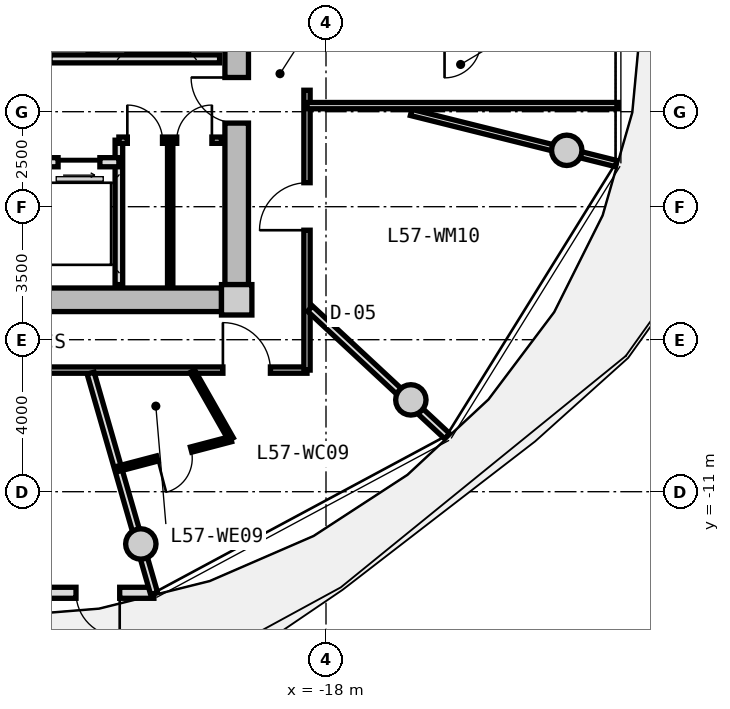
"""IFC4 building model, lengths in metres.
Left out: names, types, materials, properties, quantities, classifications, styles, units other than length and angle.
Written with IfcOpenShell. Run it as: python <this file> out.ifc"""

import sys

from ifc_helpers import new_model, si_unit, direction, frame, frame_2d, origin, origin_2d, place, context, subcontext, project, spatial, rectangle, circle, extrude, source, transform, mapped, element, fill, save


model = new_model("IFC4")
c1 = context("Model", 3, precision=1e-05, world=origin(), true_north=direction((0.0, 1.0)))
c2 = subcontext(c1, "Body", "Model", "MODEL_VIEW")
j1 = project(units=[si_unit("LENGTHUNIT", "METRE"), si_unit("PLANEANGLEUNIT", "RADIAN")], contexts=[c1])
p1 = place(None, origin())
s1 = spatial("IfcSite", under=j1, at=p1, CompositionType="ELEMENT")
p2 = place(p1, origin())
s2 = spatial("IfcBuilding", under=s1, at=p2, CompositionType="ELEMENT")
p3 = place(p2, frame((0.0, 0.0, 183.1)))
s3 = spatial("IfcBuildingStorey", under=s2, at=p3, CompositionType="ELEMENT", Elevation=183.1)
m1 = source(origin(), c2, "Body", "SweptSolid", [
    extrude(rectangle(XDim=0.8, YDim=0.8, at=origin_2d()), origin(), (0.0, 0.0, 1.0), 3.05),
])
p4 = place(p3, frame((-20.35, -5.95, 0.0), z_axis=(0.0, 0.0, 1.0), x_axis=(1.0, 0.0, 0.0)))
e1 = element("IfcColumn", 1, at=p4, inside=s3, PredefinedType="COLUMN", context=c2, shape_type="MappedRepresentation", body=[
    mapped(m1, transform((0.0, 0.0, 0.0), x_axis=(1.0, 0.0, 0.0), y_axis=(0.0, 1.0, 0.0), z_axis=(0.0, 0.0, 1.0), scale=1.0)),
])
m2 = source(origin(), c2, "Body", "SweptSolid", [
    extrude(rectangle(XDim=14.5, YDim=0.62, at=frame_2d((7.25, 0.0))), origin(), (0.0, 0.0, 1.0), 2.73),
])
p5 = place(p3, frame((-20.75, -5.95, 0.0), z_axis=(0.0, 0.0, 1.0), x_axis=(-1.0, 0.0, 0.0)))
e2 = element("IfcWall", 2, at=p5, inside=s3, PredefinedType="SHEAR", context=c2, shape_type="MappedRepresentation", body=[
    mapped(m2, transform((0.0, 0.0, 0.0), x_axis=(1.0, 0.0, 0.0), y_axis=(0.0, 1.0, 0.0), z_axis=(0.0, 0.0, 1.0), scale=1.0)),
])
m3 = source(origin(), c2, "Body", "SweptSolid", [
    extrude(rectangle(XDim=11.1, YDim=0.62, at=frame_2d((5.55, 0.0))), origin(), (0.0, 0.0, 1.0), 2.73),
])
p6 = place(p3, frame((-20.35, 5.55, 0.0), z_axis=(0.0, 0.0, 1.0), x_axis=(0.0, -1.0, 0.0)))
e3 = element("IfcWall", 3, at=p6, inside=s3, PredefinedType="SHEAR", context=c2, shape_type="MappedRepresentation", body=[
    mapped(m3, transform((0.0, 0.0, 0.0), x_axis=(1.0, 0.0, 0.0), y_axis=(0.0, 1.0, 0.0), z_axis=(0.0, 0.0, 1.0), scale=1.0)),
])
p7 = place(p6, frame((5.65, 0.0, 0.0)))
e4 = element("IfcOpeningElement", 4, at=p7, cuts=e3, PredefinedType="OPENING", context=c2, shape_type="SweptSolid", body=[
    extrude(rectangle(XDim=1.2, YDim=2.15, at=frame_2d((0.6, 1.075))), frame((0.0, 0.32, 0.0), z_axis=(0.0, -1.0, 0.0), x_axis=(1.0, 0.0, 0.0)), (0.0, 0.0, 1.0), 0.64),
])
m4 = source(origin(), c2, "Body", "SweptSolid", [
    extrude(circle(Radius=0.4, at=origin_2d()), origin(), (0.0, 0.0, 1.0), 3.05),
])
for number, where, z_axis, x_axis in (
    (5, (-22.873, -12.375, 0.0), (0.0, 0.0, 1.0), (1.0, 0.0, 0.0)),
    (6, (-15.767, -8.584, 0.0), (0.0, 0.0, 1.0), (1.0, 0.0, 0.0)),
    (7, (-11.665, -2.016, 0.0), (0.0, 0.0, 1.0), (1.0, 0.0, 0.0)),
):
    element("IfcColumn", number, at=place(p3, frame(where, z_axis=z_axis, x_axis=x_axis)), inside=s3, PredefinedType="COLUMN", context=c2, shape_type="MappedRepresentation", body=[
        mapped(m4, transform((0.0, 0.0, 0.0), x_axis=(1.0, 0.0, 0.0), y_axis=(0.0, 1.0, 0.0), z_axis=(0.0, 0.0, 1.0), scale=1.0)),
    ])
m5 = source(origin(), c2, "Body", "SweptSolid", [
    extrude(rectangle(XDim=8.893, YDim=0.29, at=frame_2d((4.447, 0.0))), origin(), (0.0, 0.0, 1.0), 2.73),
])
p8 = place(p3, frame((-22.529, -13.66, 0.0), z_axis=(0.0, 0.0, 1.0), x_axis=(-1.0, 0.0, 0.0)))
e8 = element("IfcWall", 8, at=p8, inside=s3, PredefinedType="SOLIDWALL", context=c2, shape_type="MappedRepresentation", body=[
    mapped(m5, transform((0.0, 0.0, 0.0), x_axis=(1.0, 0.0, 0.0), y_axis=(0.0, 1.0, 0.0), z_axis=(0.0, 0.0, 1.0), scale=1.0)),
])
p9 = place(p8, frame((0.9, 0.0, 0.0)))
e9 = element("IfcOpeningElement", 9, at=p9, cuts=e8, PredefinedType="OPENING", context=c2, shape_type="SweptSolid", body=[
    extrude(rectangle(XDim=1.15, YDim=2.25, at=frame_2d((0.575, 1.125))), frame((0.0, 0.155, 0.0), z_axis=(0.0, -1.0, 0.0), x_axis=(1.0, 0.0, 0.0)), (0.0, 0.0, 1.0), 0.31),
])
p10 = place(p8, frame((4.796, 0.0, 0.85)))
e10 = element("IfcOpeningElement", 10, at=p10, cuts=e8, PredefinedType="OPENING", context=c2, shape_type="SweptSolid", body=[
    extrude(rectangle(XDim=1.2, YDim=1.5, at=frame_2d((0.6, 0.75))), frame((0.0, 0.155, 0.0), z_axis=(0.0, -1.0, 0.0), x_axis=(1.0, 0.0, 0.0)), (0.0, 0.0, 1.0), 0.31),
])
m6 = source(origin(), c2, "Body", "SweptSolid", [
    extrude(rectangle(XDim=5.0, YDim=0.24, at=frame_2d((2.5, 0.0))), origin(), (0.0, 0.0, 1.0), 2.715),
])
p11 = place(p3, frame((-24.14, 0.5, 0.0), z_axis=(0.0, 0.0, 1.0), x_axis=(0.0, 1.0, 0.0)))
e11 = element("IfcWall", 11, at=p11, inside=s3, PredefinedType="PARTITIONING", context=c2, shape_type="MappedRepresentation", body=[
    mapped(m6, transform((0.0, 0.0, 0.0), x_axis=(1.0, 0.0, 0.0), y_axis=(0.0, 1.0, 0.0), z_axis=(0.0, 0.0, 1.0), scale=1.0)),
])
p12 = place(p11, frame((3.05, 0.0, 0.0)))
e12 = element("IfcOpeningElement", 12, at=p12, cuts=e11, PredefinedType="OPENING", context=c2, shape_type="SweptSolid", body=[
    extrude(rectangle(XDim=1.3, YDim=2.2, at=frame_2d((0.65, 1.1))), frame((0.0, 0.13, 0.0), z_axis=(0.0, -1.0, 0.0), x_axis=(1.0, 0.0, 0.0)), (0.0, 0.0, 1.0), 0.26),
])
p13 = place(p11, frame((0.55, 0.0, 0.0)))
e13 = element("IfcOpeningElement", 13, at=p13, cuts=e11, PredefinedType="OPENING", context=c2, shape_type="SweptSolid", body=[
    extrude(rectangle(XDim=1.3, YDim=2.2, at=frame_2d((0.65, 1.1))), frame((0.0, 0.13, 0.0), z_axis=(0.0, -1.0, 0.0), x_axis=(1.0, 0.0, 0.0)), (0.0, 0.0, 1.0), 0.26),
])
m7 = source(origin(), c2, "Body", "SweptSolid", [
    extrude(rectangle(XDim=6.66, YDim=0.21, at=frame_2d((3.33, 0.0))), origin(), (0.0, 0.0, 1.0), 2.715),
])
p14 = place(p3, frame((-27.46, 0.39, 0.0), z_axis=(0.0, 0.0, 1.0), x_axis=(1.0, 0.0, 0.0)))
e14 = element("IfcWall", 14, at=p14, inside=s3, PredefinedType="PARTITIONING", context=c2, shape_type="MappedRepresentation", body=[
    mapped(m7, transform((0.0, 0.0, 0.0), x_axis=(1.0, 0.0, 0.0), y_axis=(0.0, 1.0, 0.0), z_axis=(0.0, 0.0, 1.0), scale=1.0)),
])
p15 = place(p14, frame((1.0, 0.0, 0.0)))
e15 = element("IfcOpeningElement", 15, at=p15, cuts=e14, PredefinedType="OPENING", context=c2, shape_type="SweptSolid", body=[
    extrude(rectangle(XDim=1.2, YDim=2.15, at=frame_2d((0.6, 1.075))), frame((0.0, 0.115, 0.0), z_axis=(0.0, -1.0, 0.0), x_axis=(1.0, 0.0, 0.0)), (0.0, 0.0, 1.0), 0.23),
])
m8 = source(origin(), c2, "Body", "SweptSolid", [
    extrude(rectangle(XDim=3.8, YDim=0.2, at=frame_2d((1.9, 0.0))), origin(), (0.0, 0.0, 1.0), 2.715),
])
p16 = place(p3, frame((-23.45, -5.55, 0.0), z_axis=(0.0, 0.0, 1.0), x_axis=(0.0, 1.0, 0.0)))
e16 = element("IfcWall", 16, at=p16, inside=s3, PredefinedType="PARTITIONING", context=c2, shape_type="MappedRepresentation", body=[
    mapped(m8, transform((0.0, 0.0, 0.0), x_axis=(1.0, 0.0, 0.0), y_axis=(0.0, 1.0, 0.0), z_axis=(0.0, 0.0, 1.0), scale=1.0)),
])
m9 = source(origin(), c2, "Body", "SweptSolid", [
    extrude(rectangle(XDim=2.05, YDim=0.24, at=frame_2d((1.025, 0.0))), origin(), (0.0, 0.0, 1.0), 2.715),
])
p17 = place(p3, frame((-25.5, -2.33, 0.0), z_axis=(0.0, 0.0, 1.0), x_axis=(1.0, 0.0, 0.0)))
e17 = element("IfcWall", 17, at=p17, inside=s3, PredefinedType="PARTITIONING", context=c2, shape_type="MappedRepresentation", body=[
    mapped(m9, transform((0.0, 0.0, 0.0), x_axis=(1.0, 0.0, 0.0), y_axis=(0.0, 1.0, 0.0), z_axis=(0.0, 0.0, 1.0), scale=1.0)),
])
p18 = place(p17, frame((0.45, 0.0, 0.0)))
e18 = element("IfcOpeningElement", 18, at=p18, cuts=e17, PredefinedType="OPENING", context=c2, shape_type="SweptSolid", body=[
    extrude(rectangle(XDim=1.1, YDim=2.2, at=frame_2d((0.55, 1.1))), frame((0.0, 0.13, 0.0), z_axis=(0.0, -1.0, 0.0), x_axis=(1.0, 0.0, 0.0)), (0.0, 0.0, 1.0), 0.26),
])
m10 = source(origin(), c2, "Body", "SweptSolid", [
    extrude(rectangle(XDim=2.7, YDim=0.165, at=frame_2d((1.35, 0.0))), origin(), (0.0, 0.0, 1.0), 2.715),
])
p19 = place(p3, frame((-23.45, -1.75, 0.0), z_axis=(0.0, 0.0, 1.0), x_axis=(1.0, 0.0, 0.0)))
e19 = element("IfcWall", 19, at=p19, inside=s3, PredefinedType="PARTITIONING", context=c2, shape_type="MappedRepresentation", body=[
    mapped(m10, transform((0.0, 0.0, 0.0), x_axis=(1.0, 0.0, 0.0), y_axis=(0.0, 1.0, 0.0), z_axis=(0.0, 0.0, 1.0), scale=1.0)),
])
p20 = place(p19, frame((0.222, 0.0, 0.0)))
e20 = element("IfcOpeningElement", 20, at=p20, cuts=e19, PredefinedType="OPENING", context=c2, shape_type="SweptSolid", body=[
    extrude(rectangle(XDim=0.925, YDim=2.1, at=frame_2d((0.462, 1.05))), frame((0.0, 0.093, 0.0), z_axis=(0.0, -1.0, 0.0), x_axis=(1.0, 0.0, 0.0)), (0.0, 0.0, 1.0), 0.185),
])
p21 = place(p19, frame((1.522, 0.0, 0.0)))
e21 = element("IfcOpeningElement", 21, at=p21, cuts=e19, PredefinedType="OPENING", context=c2, shape_type="SweptSolid", body=[
    extrude(rectangle(XDim=0.925, YDim=2.1, at=frame_2d((0.462, 1.05))), frame((0.0, 0.093, 0.0), z_axis=(0.0, -1.0, 0.0), x_axis=(1.0, 0.0, 0.0)), (0.0, 0.0, 1.0), 0.185),
])
m11 = source(origin(), c2, "Body", "SweptSolid", [
    extrude(rectangle(XDim=3.8, YDim=0.14, at=frame_2d((1.9, 0.0))), origin(), (0.0, 0.0, 1.0), 2.715),
])
p22 = place(p3, frame((-22.1, -5.55, 0.0), z_axis=(0.0, 0.0, 1.0), x_axis=(0.0, 1.0, 0.0)))
e22 = element("IfcWall", 22, at=p22, inside=s3, PredefinedType="PARTITIONING", context=c2, shape_type="MappedRepresentation", body=[
    mapped(m11, transform((0.0, 0.0, 0.0), x_axis=(1.0, 0.0, 0.0), y_axis=(0.0, 1.0, 0.0), z_axis=(0.0, 0.0, 1.0), scale=1.0)),
])
m12 = source(origin(), c2, "Body", "SweptSolid", [
    extrude(rectangle(XDim=19.0, YDim=0.165, at=frame_2d((9.5, 0.0))), origin(), (0.0, 0.0, 1.0), 2.715),
])
p23 = place(p3, frame((-18.5, -7.8, 0.0), z_axis=(0.0, 0.0, 1.0), x_axis=(-1.0, 0.0, 0.0)))
e23 = element("IfcWall", 23, at=p23, inside=s3, PredefinedType="PARTITIONING", context=c2, shape_type="MappedRepresentation", body=[
    mapped(m12, transform((0.0, 0.0, 0.0), x_axis=(1.0, 0.0, 0.0), y_axis=(0.0, 1.0, 0.0), z_axis=(0.0, 0.0, 1.0), scale=1.0)),
])
p24 = place(p23, frame((11.598, 0.0, 0.0)))
e24 = element("IfcOpeningElement", 24, at=p24, cuts=e23, PredefinedType="OPENING", context=c2, shape_type="SweptSolid", body=[
    extrude(rectangle(XDim=1.25, YDim=2.2, at=frame_2d((0.625, 1.1))), frame((0.0, 0.093, 0.0), z_axis=(0.0, -1.0, 0.0), x_axis=(1.0, 0.0, 0.0)), (0.0, 0.0, 1.0), 0.185),
])
p25 = place(p23, frame((0.963, 0.0, 0.0)))
e25 = element("IfcOpeningElement", 25, at=p25, cuts=e23, PredefinedType="OPENING", context=c2, shape_type="SweptSolid", body=[
    extrude(rectangle(XDim=1.25, YDim=2.2, at=frame_2d((0.625, 1.1))), frame((0.0, 0.093, 0.0), z_axis=(0.0, -1.0, 0.0), x_axis=(1.0, 0.0, 0.0)), (0.0, 0.0, 1.0), 0.185),
])
m13 = source(origin(), c2, "Body", "SweptSolid", [
    extrude(rectangle(XDim=7.365, YDim=0.165, at=frame_2d((3.682, 0.0))), origin(), (0.0, 0.0, 1.0), 2.715),
])
p26 = place(p3, frame((-18.5, -0.436, 0.0), z_axis=(0.0, 0.0, 1.0), x_axis=(0.0, -1.0, 0.0)))
e26 = element("IfcWall", 26, at=p26, inside=s3, PredefinedType="PARTITIONING", context=c2, shape_type="MappedRepresentation", body=[
    mapped(m13, transform((0.0, 0.0, 0.0), x_axis=(1.0, 0.0, 0.0), y_axis=(0.0, 1.0, 0.0), z_axis=(0.0, 0.0, 1.0), scale=1.0)),
])
p27 = place(p26, frame((2.433, 0.0, 0.0)))
e27 = element("IfcOpeningElement", 27, at=p27, cuts=e26, PredefinedType="OPENING", context=c2, shape_type="SweptSolid", body=[
    extrude(rectangle(XDim=1.25, YDim=2.2, at=frame_2d((0.625, 1.1))), frame((0.0, 0.093, 0.0), z_axis=(0.0, -1.0, 0.0), x_axis=(1.0, 0.0, 0.0)), (0.0, 0.0, 1.0), 0.185),
])
m14 = source(origin(), c2, "Body", "SweptSolid", [
    extrude(rectangle(XDim=5.564, YDim=0.165, at=frame_2d((2.782, 0.0))), origin(), (0.0, 0.0, 1.0), 2.265),
])
p28 = place(p3, frame((-15.76, -1.02, 0.0), z_axis=(0.0, 0.0, 1.0), x_axis=(0.970315176167, -0.241843872984, 0.0)))
e28 = element("IfcWall", 28, at=p28, inside=s3, PredefinedType="PARTITIONING", context=c2, shape_type="MappedRepresentation", body=[
    mapped(m14, transform((0.0, 0.0, 0.0), x_axis=(1.0, 0.0, 0.0), y_axis=(0.0, 1.0, 0.0), z_axis=(0.0, 0.0, 1.0), scale=1.0)),
])
m15 = source(origin(), c2, "Body", "SweptSolid", [
    extrude(rectangle(XDim=8.189, YDim=0.165, at=frame_2d((4.094, 0.0))), origin(), (0.0, 0.0, 1.0), 2.715),
])
p29 = place(p3, frame((-10.311, -0.84, 0.0), z_axis=(0.0, 0.0, 1.0), x_axis=(-1.0, 0.0, 0.0)))
e29 = element("IfcWall", 29, at=p29, inside=s3, PredefinedType="PARTITIONING", context=c2, shape_type="MappedRepresentation", body=[
    mapped(m15, transform((0.0, 0.0, 0.0), x_axis=(1.0, 0.0, 0.0), y_axis=(0.0, 1.0, 0.0), z_axis=(0.0, 0.0, 1.0), scale=1.0)),
])
m16 = source(origin(), c2, "Body", "SweptSolid", [
    extrude(rectangle(XDim=6.035, YDim=0.19, at=frame_2d((3.018, 0.0))), origin(), (0.0, 0.0, 1.0), 2.265),
])
p30 = place(p3, frame((-24.194, -7.88, 0.0), z_axis=(0.0, 0.0, 1.0), x_axis=(0.276809454862, -0.960924828329, 0.0)))
e30 = element("IfcWall", 30, at=p30, inside=s3, PredefinedType="PARTITIONING", context=c2, shape_type="MappedRepresentation", body=[
    mapped(m16, transform((0.0, 0.0, 0.0), x_axis=(1.0, 0.0, 0.0), y_axis=(0.0, 1.0, 0.0), z_axis=(0.0, 0.0, 1.0), scale=1.0)),
])
m17 = source(origin(), c2, "Body", "SweptSolid", [
    extrude(rectangle(XDim=4.927, YDim=0.19, at=frame_2d((2.463, 0.0))), origin(), (0.0, 0.0, 1.0), 2.265),
])
p31 = place(p3, frame((-18.42, -6.183, 0.0), z_axis=(0.0, 0.0, 1.0), x_axis=(0.732191335987, -0.681098999783, 0.0)))
e31 = element("IfcWall", 31, at=p31, inside=s3, PredefinedType="PARTITIONING", context=c2, shape_type="MappedRepresentation", body=[
    mapped(m17, transform((0.0, 0.0, 0.0), x_axis=(1.0, 0.0, 0.0), y_axis=(0.0, 1.0, 0.0), z_axis=(0.0, 0.0, 1.0), scale=1.0)),
])
m18 = source(origin(), c2, "Body", "SweptSolid", [
    extrude(rectangle(XDim=2.055, YDim=0.14, at=frame_2d((1.027, 0.0))), origin(), (0.0, 0.0, 1.0), 2.715),
])
p32 = place(p3, frame((-21.516, -7.83, 0.0), z_axis=(0.0, 0.0, 1.0), x_axis=(0.494154336367, -0.869374195528, 0.0)))
e32 = element("IfcWall", 32, at=p32, inside=s3, PredefinedType="PARTITIONING", context=c2, shape_type="MappedRepresentation", body=[
    mapped(m18, transform((0.0, 0.0, 0.0), x_axis=(1.0, 0.0, 0.0), y_axis=(0.0, 1.0, 0.0), z_axis=(0.0, 0.0, 1.0), scale=1.0)),
])
m19 = source(origin(), c2, "Body", "SweptSolid", [
    extrude(rectangle(XDim=3.088, YDim=0.14, at=frame_2d((1.544, 0.0))), origin(), (0.0, 0.0, 1.0), 2.715),
])
p33 = place(p3, frame((-20.501, -9.616, 0.0), z_axis=(0.0, 0.0, 1.0), x_axis=(-0.967224898254, -0.253921240146, 0.0)))
e33 = element("IfcWall", 33, at=p33, inside=s3, PredefinedType="PARTITIONING", context=c2, shape_type="MappedRepresentation", body=[
    mapped(m19, transform((0.0, 0.0, 0.0), x_axis=(1.0, 0.0, 0.0), y_axis=(0.0, 1.0, 0.0), z_axis=(0.0, 0.0, 1.0), scale=1.0)),
])
p34 = place(p33, frame((1.084, 0.0, 0.0)))
e34 = element("IfcOpeningElement", 34, at=p34, cuts=e33, PredefinedType="OPENING", context=c2, shape_type="SweptSolid", body=[
    extrude(rectangle(XDim=0.92, YDim=2.1, at=frame_2d((0.46, 1.05))), frame((0.0, 0.08, 0.0), z_axis=(0.0, -1.0, 0.0), x_axis=(1.0, 0.0, 0.0)), (0.0, 0.0, 1.0), 0.16),
])
m20 = source(origin(), c2, "Body", "SweptSolid", [
    extrude(rectangle(XDim=1.15, YDim=2.25, at=frame_2d((0.575, 1.125))), frame((0.0, 0.025, 0.0), z_axis=(0.0, -1.0, 0.0), x_axis=(1.0, 0.0, 0.0)), (0.0, 0.0, 1.0), 0.05),
])
p35 = place(p9, origin())
e35 = element("IfcDoor", 35, at=p35, inside=s3, OperationType="SINGLE_SWING_LEFT", PredefinedType="DOOR", context=c2, shape_type="MappedRepresentation", body=[
    mapped(m20, transform((0.0, 0.0, 0.0), x_axis=(1.0, 0.0, 0.0), y_axis=(0.0, 1.0, 0.0), z_axis=(0.0, 0.0, 1.0), scale=1.0)),
])
fill(e9, e35)
m21 = source(origin(), c2, "Body", "SweptSolid", [
    extrude(rectangle(XDim=1.2, YDim=2.15, at=frame_2d((0.6, 1.075))), frame((0.0, 0.025, 0.0), z_axis=(0.0, -1.0, 0.0), x_axis=(1.0, 0.0, 0.0)), (0.0, 0.0, 1.0), 0.05),
])
p36 = place(p7, frame((1.2, 0.0, 0.0), z_axis=(0.0, 0.0, 1.0), x_axis=(-1.0, 0.0, 0.0)))
e36 = element("IfcDoor", 36, at=p36, inside=s3, OperationType="SINGLE_SWING_RIGHT", PredefinedType="DOOR", context=c2, shape_type="MappedRepresentation", body=[
    mapped(m21, transform((0.0, 0.0, 0.0), x_axis=(1.0, 0.0, 0.0), y_axis=(0.0, 1.0, 0.0), z_axis=(0.0, 0.0, 1.0), scale=1.0)),
])
fill(e4, e36)
m22 = source(origin(), c2, "Body", "SweptSolid", [
    extrude(rectangle(XDim=1.1, YDim=2.2, at=frame_2d((0.55, 1.1))), frame((0.0, 0.025, 0.0), z_axis=(0.0, -1.0, 0.0), x_axis=(1.0, 0.0, 0.0)), (0.0, 0.0, 1.0), 0.05),
])
p37 = place(p18, frame((1.1, 0.0, 0.0), z_axis=(0.0, 0.0, 1.0), x_axis=(-1.0, 0.0, 0.0)))
e37 = element("IfcDoor", 37, at=p37, inside=s3, OperationType="SLIDING_TO_RIGHT", PredefinedType="DOOR", context=c2, shape_type="MappedRepresentation", body=[
    mapped(m22, transform((0.0, 0.0, 0.0), x_axis=(1.0, 0.0, 0.0), y_axis=(0.0, 1.0, 0.0), z_axis=(0.0, 0.0, 1.0), scale=1.0)),
])
fill(e18, e37)
m23 = source(origin(), c2, "Body", "SweptSolid", [
    extrude(rectangle(XDim=0.925, YDim=2.1, at=frame_2d((0.462, 1.05))), frame((0.0, 0.025, 0.0), z_axis=(0.0, -1.0, 0.0), x_axis=(1.0, 0.0, 0.0)), (0.0, 0.0, 1.0), 0.05),
])
p38 = place(p20, origin())
e38 = element("IfcDoor", 38, at=p38, inside=s3, OperationType="SINGLE_SWING_LEFT", PredefinedType="DOOR", context=c2, shape_type="MappedRepresentation", body=[
    mapped(m23, transform((0.0, 0.0, 0.0), x_axis=(1.0, 0.0, 0.0), y_axis=(0.0, 1.0, 0.0), z_axis=(0.0, 0.0, 1.0), scale=1.0)),
])
fill(e20, e38)
p39 = place(p21, origin())
e39 = element("IfcDoor", 39, at=p39, inside=s3, OperationType="SINGLE_SWING_RIGHT", PredefinedType="DOOR", context=c2, shape_type="MappedRepresentation", body=[
    mapped(m23, transform((0.0, 0.0, 0.0), x_axis=(1.0, 0.0, 0.0), y_axis=(0.0, 1.0, 0.0), z_axis=(0.0, 0.0, 1.0), scale=1.0)),
])
fill(e21, e39)
m24 = source(origin(), c2, "Body", "SweptSolid", [
    extrude(rectangle(XDim=1.25, YDim=2.2, at=frame_2d((0.625, 1.1))), frame((0.0, 0.025, 0.0), z_axis=(0.0, -1.0, 0.0), x_axis=(1.0, 0.0, 0.0)), (0.0, 0.0, 1.0), 0.05),
])
p40 = place(p25, frame((1.25, 0.0, 0.0), z_axis=(0.0, 0.0, 1.0), x_axis=(-1.0, 0.0, 0.0)))
e40 = element("IfcDoor", 40, at=p40, inside=s3, OperationType="SINGLE_SWING_LEFT", PredefinedType="DOOR", context=c2, shape_type="MappedRepresentation", body=[
    mapped(m24, transform((0.0, 0.0, 0.0), x_axis=(1.0, 0.0, 0.0), y_axis=(0.0, 1.0, 0.0), z_axis=(0.0, 0.0, 1.0), scale=1.0)),
])
fill(e25, e40)
m25 = source(origin(), c2, "Body", "SweptSolid", [
    extrude(rectangle(XDim=0.92, YDim=2.1, at=frame_2d((0.46, 1.05))), frame((0.0, 0.025, 0.0), z_axis=(0.0, -1.0, 0.0), x_axis=(1.0, 0.0, 0.0)), (0.0, 0.0, 1.0), 0.05),
])
p41 = place(p34, origin())
e41 = element("IfcDoor", 41, at=p41, inside=s3, OperationType="SINGLE_SWING_RIGHT", PredefinedType="DOOR", context=c2, shape_type="MappedRepresentation", body=[
    mapped(m25, transform((0.0, 0.0, 0.0), x_axis=(1.0, 0.0, 0.0), y_axis=(0.0, 1.0, 0.0), z_axis=(0.0, 0.0, 1.0), scale=1.0)),
])
fill(e34, e41)
p42 = place(p27, frame((1.25, 0.0, 0.0), z_axis=(0.0, 0.0, 1.0), x_axis=(-1.0, 0.0, 0.0)))
e42 = element("IfcDoor", 42, at=p42, inside=s3, OperationType="SINGLE_SWING_LEFT", PredefinedType="DOOR", context=c2, shape_type="MappedRepresentation", body=[
    mapped(m24, transform((0.0, 0.0, 0.0), x_axis=(1.0, 0.0, 0.0), y_axis=(0.0, 1.0, 0.0), z_axis=(0.0, 0.0, 1.0), scale=1.0)),
])
fill(e27, e42)
save(model, sys.argv[1])
